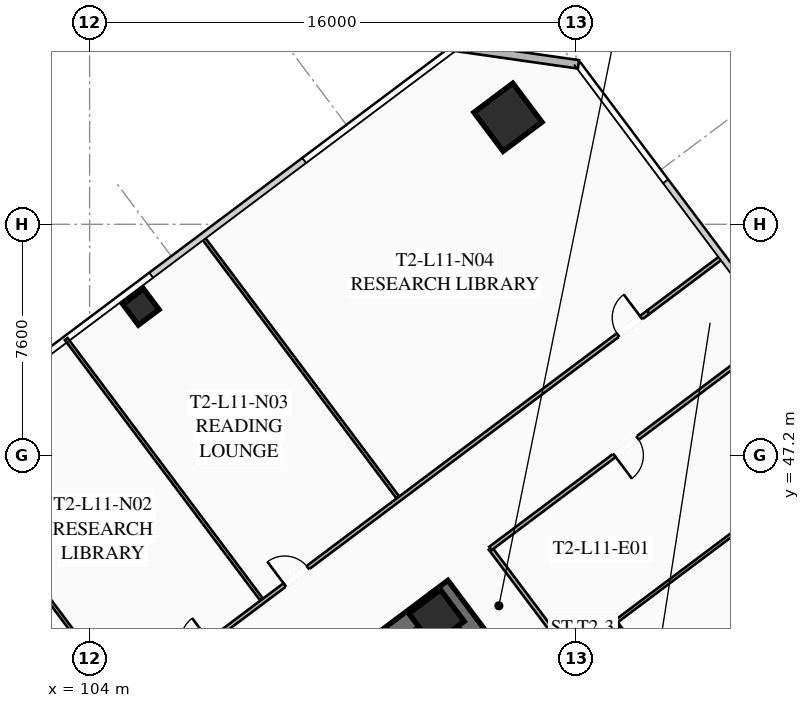
"""IFC4 building model, lengths in metres.
Left out: names, types, materials, properties, quantities, classifications, styles, units other than length and angle.
Written with IfcOpenShell. Run it as: python <this file> out.ifc"""

import sys

from ifc_helpers import new_model, si_unit, direction, frame, frame_2d, origin, origin_2d, place, context, subcontext, project, spatial, rectangle, hollow_rectangle, extrude, element, fill, save


model = new_model("IFC4")
c1 = context("Model", 3, precision=1e-05, world=origin(), true_north=direction((0.0, 1.0)))
c2 = subcontext(c1, "Body", "Model", "MODEL_VIEW")
j1 = project(units=[si_unit("LENGTHUNIT", "METRE"), si_unit("PLANEANGLEUNIT", "RADIAN")], contexts=[c1])
p1 = place(None, origin())
s1 = spatial("IfcSite", under=j1, at=p1, CompositionType="ELEMENT")
p2 = place(p1, origin())
s2 = spatial("IfcBuilding", under=s1, at=p2, CompositionType="ELEMENT")
p3 = place(p2, frame((0.0, 0.0, 45.9)))
s3 = spatial("IfcBuildingStorey", under=s2, at=p3, CompositionType="ELEMENT", Elevation=45.9)
p4 = place(p3, frame((115.524, 42.893, 0.0), z_axis=(0.0, 0.0, 1.0), x_axis=(0.600005007985, -0.799996243986, 0.0)))
e1 = element("IfcWall", 1, at=p4, inside=s3, PredefinedType="SHEAR", context=c2, shape_type="SweptSolid", body=[
    extrude(rectangle(XDim=15.6, YDim=0.65, at=frame_2d((7.8, 0.0))), origin(), (0.0, 0.0, 1.0), 3.55),
])
p5 = place(p3, frame((103.571, 33.522, 0.0), z_axis=(0.0, 0.0, 1.0), x_axis=(0.799998028465, 0.600002628705, 0.0)))
e2 = element("IfcWall", 2, at=p5, inside=s3, PredefinedType="SHEAR", context=c2, shape_type="SweptSolid", body=[
    extrude(rectangle(XDim=14.86, YDim=0.65, at=frame_2d((7.43, 0.0))), origin(), (0.0, 0.0, 1.0), 3.55),
])
p6 = place(p5, frame((4.48, 0.0, 0.0)))
e3 = element("IfcOpeningElement", 3, at=p6, cuts=e2, PredefinedType="OPENING", context=c2, shape_type="SweptSolid", body=[
    extrude(rectangle(XDim=1.25, YDim=2.25, at=frame_2d((0.625, 1.125))), frame((0.0, 0.335, 0.0), z_axis=(0.0, -1.0, 0.0), x_axis=(1.0, 0.0, 0.0)), (0.0, 0.0, 1.0), 0.67),
])
p7 = place(p5, frame((9.53, 0.0, 0.0)))
e4 = element("IfcOpeningElement", 4, at=p7, cuts=e2, PredefinedType="OPENING", context=c2, shape_type="SweptSolid", body=[
    extrude(rectangle(XDim=1.25, YDim=2.25, at=frame_2d((0.625, 1.125))), frame((0.0, 0.335, 0.0), z_axis=(0.0, -1.0, 0.0), x_axis=(1.0, 0.0, 0.0)), (0.0, 0.0, 1.0), 0.67),
])
p8 = place(p3, frame((115.41, 41.87, 0.0), z_axis=(0.0, 0.0, 1.0), x_axis=(0.799999996291, 0.600000004945, 0.0)))
e5 = element("IfcColumn", 5, at=p8, inside=s3, PredefinedType="COLUMN", context=c2, shape_type="SweptSolid", body=[
    extrude(hollow_rectangle(XDim=1.3, YDim=1.3, WallThickness=0.05, at=origin_2d()), origin(), (0.0, 0.0, 1.0), 3.35),
])
p9 = place(p3, frame((117.76, 58.32, 0.0), z_axis=(0.0, 0.0, 1.0), x_axis=(0.799999996291, 0.600000004945, 0.0)))
e6 = element("IfcColumn", 6, at=p9, inside=s3, PredefinedType="COLUMN", context=c2, shape_type="SweptSolid", body=[
    extrude(hollow_rectangle(XDim=1.6, YDim=1.6, WallThickness=0.06, at=origin_2d()), origin(), (0.0, 0.0, 1.0), 3.35),
])
p10 = place(p3, frame((105.69, 52.08, 0.0), z_axis=(0.0, 0.0, 1.0), x_axis=(0.799999996291, 0.600000004945, 0.0)))
e7 = element("IfcColumn", 7, at=p10, inside=s3, PredefinedType="COLUMN", context=c2, shape_type="SweptSolid", body=[
    extrude(hollow_rectangle(XDim=0.85, YDim=0.85, WallThickness=0.035, at=origin_2d()), origin(), (0.0, 0.0, 1.0), 3.35),
])
p11 = place(p3, frame((116.02, 60.64, 0.0), z_axis=(0.0, 0.0, 1.0), x_axis=(0.989955445613, -0.14137968631, 0.0)))
e8 = element("IfcWall", 8, at=p11, inside=s3, PredefinedType="SOLIDWALL", context=c2, shape_type="SweptSolid", body=[
    extrude(rectangle(XDim=4.101, YDim=0.28, at=frame_2d((2.051, 0.0))), origin(), (0.0, 0.0, 1.0), 3.35),
])
p12 = place(p3, frame((125.304, 36.228, 0.0), z_axis=(0.0, 0.0, 1.0), x_axis=(-0.59998851072, 0.800008616831, 0.0)))
e9 = element("IfcWall", 9, at=p12, inside=s3, PredefinedType="SHEAR", context=c2, shape_type="SweptSolid", body=[
    extrude(rectangle(XDim=6.8, YDim=0.2, at=frame_2d((3.4, 0.0))), origin(), (0.0, 0.0, 1.0), 3.35),
])
p13 = place(p3, frame((121.204, 41.528, 0.0), z_axis=(0.0, 0.0, 1.0), x_axis=(-0.800017232136, -0.599977023131, 0.0)))
e10 = element("IfcWall", 10, at=p13, inside=s3, PredefinedType="SHEAR", context=c2, shape_type="SweptSolid", body=[
    extrude(rectangle(XDim=3.4, YDim=0.2, at=frame_2d((1.7, 0.0))), origin(), (0.0, 0.0, 1.0), 3.35),
])
p14 = place(p13, frame((1.975, 0.0, 0.0)))
e11 = element("IfcOpeningElement", 11, at=p14, cuts=e10, PredefinedType="OPENING", context=c2, shape_type="SweptSolid", body=[
    extrude(rectangle(XDim=1.15, YDim=2.2, at=frame_2d((0.575, 1.1))), frame((0.0, 0.11, 0.0), z_axis=(0.0, -1.0, 0.0), x_axis=(1.0, 0.0, 0.0)), (0.0, 0.0, 1.0), 0.22),
])
p15 = place(p3, frame((119.824, 40.618, 0.0), z_axis=(0.0, 0.0, 1.0), x_axis=(-0.599982243973, 0.800013316712, 0.0)))
e12 = element("IfcWall", 12, at=p15, inside=s3, PredefinedType="PARTITIONING", context=c2, shape_type="SweptSolid", body=[
    extrude(rectangle(XDim=4.4, YDim=0.135, at=frame_2d((2.2, 0.0))), origin(), (0.0, 0.0, 1.0), 2.703),
])
p16 = place(p3, frame((98.516, 34.012, 0.0), z_axis=(0.0, 0.0, 1.0), x_axis=(0.799998035726, 0.600002619023, 0.0)))
e13 = element("IfcWall", 13, at=p16, inside=s3, PredefinedType="PARTITIONING", context=c2, shape_type="SweptSolid", body=[
    extrude(rectangle(XDim=29.83, YDim=0.135, at=frame_2d((14.915, 0.0))), origin(), (0.0, 0.0, 1.0), 2.703),
])
p17 = place(p16, frame((0.3, 0.0, 0.0)))
e14 = element("IfcOpeningElement", 14, at=p17, cuts=e13, PredefinedType="OPENING", context=c2, shape_type="SweptSolid", body=[
    extrude(rectangle(XDim=0.95, YDim=2.05, at=frame_2d((0.475, 1.025))), frame((0.0, 0.077, 0.0), z_axis=(0.0, -1.0, 0.0), x_axis=(1.0, 0.0, 0.0)), (0.0, 0.0, 1.0), 0.155),
])
p18 = place(p16, frame((10.835, 0.0, 0.0)))
e15 = element("IfcOpeningElement", 15, at=p18, cuts=e13, PredefinedType="OPENING", context=c2, shape_type="SweptSolid", body=[
    extrude(rectangle(XDim=0.95, YDim=2.05, at=frame_2d((0.475, 1.025))), frame((0.0, 0.077, 0.0), z_axis=(0.0, -1.0, 0.0), x_axis=(1.0, 0.0, 0.0)), (0.0, 0.0, 1.0), 0.155),
])
p19 = place(p16, frame((14.879, 0.0, 0.0)))
e16 = element("IfcOpeningElement", 16, at=p19, cuts=e13, PredefinedType="OPENING", context=c2, shape_type="SweptSolid", body=[
    extrude(rectangle(XDim=0.95, YDim=2.05, at=frame_2d((0.475, 1.025))), frame((0.0, 0.077, 0.0), z_axis=(0.0, -1.0, 0.0), x_axis=(1.0, 0.0, 0.0)), (0.0, 0.0, 1.0), 0.155),
])
p20 = place(p16, frame((28.58, 0.0, 0.0)))
e17 = element("IfcOpeningElement", 17, at=p20, cuts=e13, PredefinedType="OPENING", context=c2, shape_type="SweptSolid", body=[
    extrude(rectangle(XDim=0.95, YDim=2.05, at=frame_2d((0.475, 1.025))), frame((0.0, 0.077, 0.0), z_axis=(0.0, -1.0, 0.0), x_axis=(1.0, 0.0, 0.0)), (0.0, 0.0, 1.0), 0.155),
])
p21 = place(p3, frame((122.38, 51.91, 0.0), z_axis=(0.0, 0.0, 1.0), x_axis=(0.799990331366, 0.600012891296, 0.0)))
e18 = element("IfcWall", 18, at=p21, inside=s3, PredefinedType="PARTITIONING", context=c2, shape_type="SweptSolid", body=[
    extrude(rectangle(XDim=3.03, YDim=0.135, at=frame_2d((1.515, 0.0))), origin(), (0.0, 0.0, 1.0), 2.703),
])
p22 = place(p3, frame((105.172, 39.104, 0.0), z_axis=(0.0, 0.0, 1.0), x_axis=(-0.600007301277, 0.79999452399, 0.0)))
e19 = element("IfcWall", 19, at=p22, inside=s3, PredefinedType="PARTITIONING", context=c2, shape_type="SweptSolid", body=[
    extrude(rectangle(XDim=10.7, YDim=0.11, at=frame_2d((5.35, 0.0))), origin(), (0.0, 0.0, 1.0), 2.703),
])
p23 = place(p3, frame((109.652, 42.464, 0.0), z_axis=(0.0, 0.0, 1.0), x_axis=(-0.600018253432, 0.799986309601, 0.0)))
e20 = element("IfcWall", 20, at=p23, inside=s3, PredefinedType="PARTITIONING", context=c2, shape_type="SweptSolid", body=[
    extrude(rectangle(XDim=10.7, YDim=0.11, at=frame_2d((5.35, 0.0))), origin(), (0.0, 0.0, 1.0), 2.703),
])
p24 = place(p3, frame((114.132, 45.824, 0.0), z_axis=(0.0, 0.0, 1.0), x_axis=(-0.600007301277, 0.79999452399, 0.0)))
e21 = element("IfcWall", 21, at=p24, inside=s3, PredefinedType="PARTITIONING", context=c2, shape_type="SweptSolid", body=[
    extrude(rectangle(XDim=10.7, YDim=0.11, at=frame_2d((5.35, 0.0))), origin(), (0.0, 0.0, 1.0), 2.703),
])
p25 = place(p3, frame((126.544, 51.158, 0.0), z_axis=(0.0, 0.0, 1.0), x_axis=(-0.799994991918, -0.600006677385, 0.0)))
e22 = element("IfcWall", 22, at=p25, inside=s3, PredefinedType="PARTITIONING", context=c2, shape_type="SweptSolid", body=[
    extrude(rectangle(XDim=11.7, YDim=0.135, at=frame_2d((5.85, 0.0))), origin(), (0.0, 0.0, 1.0), 2.703),
])
p26 = place(p25, frame((5.65, 0.0, 0.0)))
e23 = element("IfcOpeningElement", 23, at=p26, cuts=e22, PredefinedType="OPENING", context=c2, shape_type="SweptSolid", body=[
    extrude(rectangle(XDim=0.95, YDim=2.05, at=frame_2d((0.475, 1.025))), frame((0.0, 0.077, 0.0), z_axis=(0.0, -1.0, 0.0), x_axis=(1.0, 0.0, 0.0)), (0.0, 0.0, 1.0), 0.155),
])
p27 = place(p3, frame((129.184, 47.638, 0.0), z_axis=(0.0, 0.0, 1.0), x_axis=(-0.800008922773, -0.599988102785, 0.0)))
e24 = element("IfcWall", 24, at=p27, inside=s3, PredefinedType="PARTITIONING", context=c2, shape_type="SweptSolid", body=[
    extrude(rectangle(XDim=9.85, YDim=0.11, at=frame_2d((4.925, 0.0))), origin(), (0.0, 0.0, 1.0), 2.703),
])
p28 = place(p19, origin())
e25 = element("IfcDoor", 25, at=p28, inside=s3, OperationType="SINGLE_SWING_LEFT", PredefinedType="DOOR", context=c2, shape_type="SweptSolid", body=[
    extrude(rectangle(XDim=0.95, YDim=2.05, at=frame_2d((0.475, 1.025))), frame((0.0, 0.025, 0.0), z_axis=(0.0, -1.0, 0.0), x_axis=(1.0, 0.0, 0.0)), (0.0, 0.0, 1.0), 0.05),
])
fill(e16, e25)
p29 = place(p20, origin())
e26 = element("IfcDoor", 26, at=p29, inside=s3, OperationType="SINGLE_SWING_RIGHT", PredefinedType="DOOR", context=c2, shape_type="SweptSolid", body=[
    extrude(rectangle(XDim=0.95, YDim=2.05, at=frame_2d((0.475, 1.025))), frame((0.0, 0.025, 0.0), z_axis=(0.0, -1.0, 0.0), x_axis=(1.0, 0.0, 0.0)), (0.0, 0.0, 1.0), 0.05),
])
fill(e17, e26)
p30 = place(p26, origin())
e27 = element("IfcDoor", 27, at=p30, inside=s3, OperationType="SINGLE_SWING_RIGHT", PredefinedType="DOOR", context=c2, shape_type="SweptSolid", body=[
    extrude(rectangle(XDim=0.95, YDim=2.05, at=frame_2d((0.475, 1.025))), frame((0.0, 0.025, 0.0), z_axis=(0.0, -1.0, 0.0), x_axis=(1.0, 0.0, 0.0)), (0.0, 0.0, 1.0), 0.05),
])
fill(e23, e27)
save(model, sys.argv[1])
